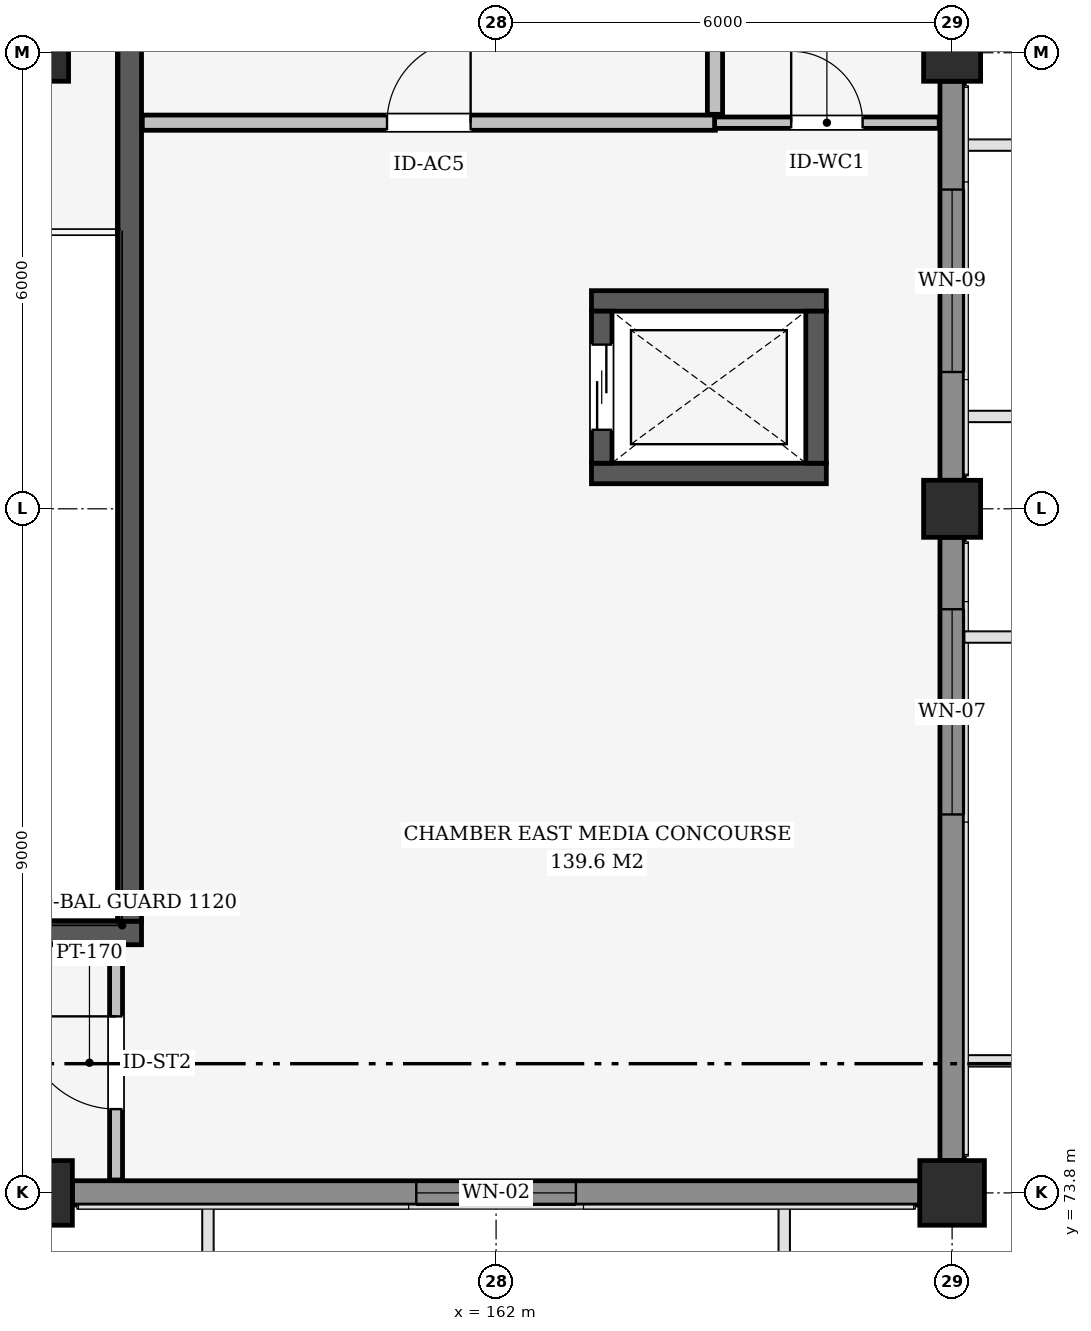
"""IFC4 building model, lengths in metres.
Left out: names, types, materials, properties, quantities, classifications, styles, units other than length and angle.
Written with IfcOpenShell. Run it as: python <this file> out.ifc"""

import sys

from ifc_helpers import new_model, si_unit, direction, frame, frame_2d, origin, origin_2d, place, context, subcontext, project, spatial, rectangle, extrude, element, fill, save


model = new_model("IFC4")
c1 = context("Model", 3, precision=1e-05, world=origin(), true_north=direction((0.0, 1.0)))
c2 = subcontext(c1, "Body", "Model", "MODEL_VIEW")
j1 = project(units=[si_unit("LENGTHUNIT", "METRE"), si_unit("PLANEANGLEUNIT", "RADIAN")], contexts=[c1])
p1 = place(None, origin())
s1 = spatial("IfcSite", under=j1, at=p1, CompositionType="ELEMENT")
p2 = place(p1, origin())
s2 = spatial("IfcBuilding", under=s1, at=p2, CompositionType="ELEMENT")
p3 = place(p2, frame((0.0, 0.0, 9.3)))
s3 = spatial("IfcBuildingStorey", under=s2, at=p3, CompositionType="ELEMENT", Elevation=9.3)
p4 = place(p3, frame((156.0, 73.8, 0.0), z_axis=(0.0, 0.0, 1.0), x_axis=(1.0, 0.0, 0.0)))
e1 = element("IfcColumn", 1, at=p4, inside=s3, PredefinedType="COLUMN", context=c2, shape_type="SweptSolid", body=[
    extrude(rectangle(XDim=0.85, YDim=0.85, at=origin_2d()), origin(), (0.0, 0.0, 1.0), 4.5),
])
p5 = place(p3, frame((156.0, 88.8, 0.0), z_axis=(0.0, 0.0, 1.0), x_axis=(1.0, 0.0, 0.0)))
e2 = element("IfcColumn", 2, at=p5, inside=s3, PredefinedType="COLUMN", context=c2, shape_type="SweptSolid", body=[
    extrude(rectangle(XDim=0.75, YDim=0.75, at=origin_2d()), origin(), (0.0, 0.0, 1.0), 4.5),
])
p6 = place(p3, frame((168.0, 73.8, 0.0), z_axis=(0.0, 0.0, 1.0), x_axis=(1.0, 0.0, 0.0)))
e3 = element("IfcColumn", 3, at=p6, inside=s3, PredefinedType="COLUMN", context=c2, shape_type="SweptSolid", body=[
    extrude(rectangle(XDim=0.85, YDim=0.85, at=origin_2d()), origin(), (0.0, 0.0, 1.0), 4.5),
])
for number, where, z_axis, x_axis in (
    (4, (168.0, 82.8, 0.0), (0.0, 0.0, 1.0), (1.0, 0.0, 0.0)),
    (5, (168.0, 88.8, 0.0), (0.0, 0.0, 1.0), (1.0, 0.0, 0.0)),
):
    element("IfcColumn", number, at=place(p3, frame(where, z_axis=z_axis, x_axis=x_axis)), inside=s3, PredefinedType="COLUMN", context=c2, shape_type="SweptSolid", body=[
        extrude(rectangle(XDim=0.75, YDim=0.75, at=origin_2d()), origin(), (0.0, 0.0, 1.0), 4.5),
    ])
p7 = place(p3, frame((144.665, 77.22, 0.0), z_axis=(0.0, 0.0, 1.0), x_axis=(1.0, 0.0, 0.0)))
e6 = element("IfcWall", 6, at=p7, inside=s3, PredefinedType="SHEAR", context=c2, shape_type="SweptSolid", body=[
    extrude(rectangle(XDim=12.67, YDim=0.31, at=frame_2d((6.335, 0.0))), origin(), (0.0, 0.0, 1.0), 2.71),
])
p8 = place(p3, frame((157.18, 77.375, 0.0), z_axis=(0.0, 0.0, 1.0), x_axis=(0.0, 1.0, 0.0)))
e7 = element("IfcWall", 7, at=p8, inside=s3, PredefinedType="SHEAR", context=c2, shape_type="SweptSolid", body=[
    extrude(rectangle(XDim=15.89, YDim=0.31, at=frame_2d((7.945, 0.0))), origin(), (0.0, 0.0, 1.0), 4.22),
])
p9 = place(p3, frame((167.575, 73.8, 0.0), z_axis=(0.0, 0.0, 1.0), x_axis=(-1.0, 0.0, 0.0)))
e8 = element("IfcWall", 8, at=p9, inside=s3, PredefinedType="SOLIDWALL", context=c2, shape_type="SweptSolid", body=[
    extrude(rectangle(XDim=11.15, YDim=0.32, at=frame_2d((5.575, 0.0))), origin(), (0.0, 0.0, 1.0), 3.664),
])
p10 = place(p9, frame((4.525, 0.0, 0.85)))
e9 = element("IfcOpeningElement", 9, at=p10, cuts=e8, PredefinedType="OPENING", context=c2, shape_type="SweptSolid", body=[
    extrude(rectangle(XDim=2.1, YDim=1.8, at=frame_2d((1.05, 0.9))), frame((0.0, 0.17, 0.0), z_axis=(0.0, -1.0, 0.0), x_axis=(1.0, 0.0, 0.0)), (0.0, 0.0, 1.0), 0.34),
])
p11 = place(p3, frame((168.0, 82.425, 0.0), z_axis=(0.0, 0.0, 1.0), x_axis=(0.0, -1.0, 0.0)))
e10 = element("IfcWall", 10, at=p11, inside=s3, PredefinedType="SOLIDWALL", context=c2, shape_type="SweptSolid", body=[
    extrude(rectangle(XDim=8.2, YDim=0.32, at=frame_2d((4.1, 0.0))), origin(), (0.0, 0.0, 1.0), 3.589),
])
p12 = place(p11, frame((0.946, 0.0, 0.85)))
e11 = element("IfcOpeningElement", 11, at=p12, cuts=e10, PredefinedType="OPENING", context=c2, shape_type="SweptSolid", body=[
    extrude(rectangle(XDim=2.7, YDim=1.95, at=frame_2d((1.35, 0.975))), frame((0.0, 0.17, 0.0), z_axis=(0.0, -1.0, 0.0), x_axis=(1.0, 0.0, 0.0)), (0.0, 0.0, 1.0), 0.34),
])
p13 = place(p3, frame((168.0, 88.425, 0.0), z_axis=(0.0, 0.0, 1.0), x_axis=(0.0, -1.0, 0.0)))
e12 = element("IfcWall", 12, at=p13, inside=s3, PredefinedType="SOLIDWALL", context=c2, shape_type="SweptSolid", body=[
    extrude(rectangle(XDim=5.25, YDim=0.32, at=frame_2d((2.625, 0.0))), origin(), (0.0, 0.0, 1.0), 3.588),
])
p14 = place(p13, frame((1.425, 0.0, 0.85)))
e13 = element("IfcOpeningElement", 13, at=p14, cuts=e12, PredefinedType="OPENING", context=c2, shape_type="SweptSolid", body=[
    extrude(rectangle(XDim=2.4, YDim=0.95, at=frame_2d((1.2, 0.475))), frame((0.0, 0.17, 0.0), z_axis=(0.0, -1.0, 0.0), x_axis=(1.0, 0.0, 0.0)), (0.0, 0.0, 1.0), 0.34),
])
for number, where, z_axis, x_axis in (
    (14, (163.255, 83.265, 0.0), (0.0, 0.0, 1.0), (1.0, 0.0, 0.0)),
    (15, (163.255, 85.535, 0.0), (0.0, 0.0, 1.0), (1.0, 0.0, 0.0)),
):
    element("IfcWall", number, at=place(p3, frame(where, z_axis=z_axis, x_axis=x_axis)), inside=s3, PredefinedType="SHEAR", context=c2, shape_type="SweptSolid", body=[
        extrude(rectangle(XDim=3.09, YDim=0.27, at=frame_2d((1.545, 0.0))), origin(), (0.0, 0.0, 1.0), 4.22),
    ])
p15 = place(p3, frame((163.39, 83.4, 0.0), z_axis=(0.0, 0.0, 1.0), x_axis=(0.0, 1.0, 0.0)))
e16 = element("IfcWall", 16, at=p15, inside=s3, PredefinedType="SHEAR", context=c2, shape_type="SweptSolid", body=[
    extrude(rectangle(XDim=2.0, YDim=0.27, at=frame_2d((1.0, 0.0))), origin(), (0.0, 0.0, 1.0), 4.22),
])
p16 = place(p15, frame((0.44, 0.0, 0.0)))
e17 = element("IfcOpeningElement", 17, at=p16, cuts=e16, PredefinedType="OPENING", context=c2, shape_type="SweptSolid", body=[
    extrude(rectangle(XDim=1.12, YDim=2.15, at=frame_2d((0.56, 1.075))), frame((0.0, 0.145, 0.0), z_axis=(0.0, -1.0, 0.0), x_axis=(1.0, 0.0, 0.0)), (0.0, 0.0, 1.0), 0.29),
])
p17 = place(p3, frame((166.21, 83.4, 0.0), z_axis=(0.0, 0.0, 1.0), x_axis=(0.0, 1.0, 0.0)))
e18 = element("IfcWall", 18, at=p17, inside=s3, PredefinedType="SHEAR", context=c2, shape_type="SweptSolid", body=[
    extrude(rectangle(XDim=2.0, YDim=0.27, at=frame_2d((1.0, 0.0))), origin(), (0.0, 0.0, 1.0), 4.22),
])
p18 = place(p3, frame((157.0, 73.97, 0.0), z_axis=(0.0, 0.0, 1.0), x_axis=(0.0, 1.0, 0.0)))
e19 = element("IfcWall", 19, at=p18, inside=s3, PredefinedType="PARTITIONING", context=c2, shape_type="SweptSolid", body=[
    extrude(rectangle(XDim=3.085, YDim=0.17, at=frame_2d((1.542, 0.0))), origin(), (0.0, 0.0, 1.0), 3.664),
])
p19 = place(p18, frame((0.933, 0.0, 0.0)))
e20 = element("IfcOpeningElement", 20, at=p19, cuts=e19, PredefinedType="OPENING", context=c2, shape_type="SweptSolid", body=[
    extrude(rectangle(XDim=1.22, YDim=2.18, at=frame_2d((0.61, 1.09))), frame((0.0, 0.095, 0.0), z_axis=(0.0, -1.0, 0.0), x_axis=(1.0, 0.0, 0.0)), (0.0, 0.0, 1.0), 0.19),
])
p20 = place(p3, frame((157.345, 87.88, 0.0), z_axis=(0.0, 0.0, 1.0), x_axis=(1.0, 0.0, 0.0)))
e21 = element("IfcWall", 21, at=p20, inside=s3, PredefinedType="PARTITIONING", context=c2, shape_type="SweptSolid", body=[
    extrude(rectangle(XDim=7.54, YDim=0.2, at=frame_2d((3.77, 0.0))), origin(), (0.0, 0.0, 1.0), 4.2),
])
p21 = place(p20, frame((3.22, 0.0, 0.0)))
e22 = element("IfcOpeningElement", 22, at=p21, cuts=e21, PredefinedType="OPENING", context=c2, shape_type="SweptSolid", body=[
    extrude(rectangle(XDim=1.1, YDim=2.26, at=frame_2d((0.55, 1.13))), frame((0.0, 0.11, 0.0), z_axis=(0.0, -1.0, 0.0), x_axis=(1.0, 0.0, 0.0)), (0.0, 0.0, 1.0), 0.22),
])
p22 = place(p3, frame((164.875, 87.88, 0.0), z_axis=(0.0, 0.0, 1.0), x_axis=(1.0, 0.0, 0.0)))
e23 = element("IfcWall", 23, at=p22, inside=s3, PredefinedType="PARTITIONING", context=c2, shape_type="SweptSolid", body=[
    extrude(rectangle(XDim=2.955, YDim=0.15, at=frame_2d((1.478, 0.0))), origin(), (0.0, 0.0, 1.0), 4.2),
])
p23 = place(p22, frame((1.008, 0.0, 0.0)))
e24 = element("IfcOpeningElement", 24, at=p23, cuts=e23, PredefinedType="OPENING", context=c2, shape_type="SweptSolid", body=[
    extrude(rectangle(XDim=0.94, YDim=2.1, at=frame_2d((0.47, 1.05))), frame((0.0, 0.085, 0.0), z_axis=(0.0, -1.0, 0.0), x_axis=(1.0, 0.0, 0.0)), (0.0, 0.0, 1.0), 0.17),
])
p24 = place(p3, frame((164.88, 87.99, 0.0), z_axis=(0.0, 0.0, 1.0), x_axis=(0.0, 1.0, 0.0)))
e25 = element("IfcWall", 25, at=p24, inside=s3, PredefinedType="PARTITIONING", context=c2, shape_type="SweptSolid", body=[
    extrude(rectangle(XDim=9.04, YDim=0.2, at=frame_2d((4.52, 0.0))), origin(), (0.0, 0.0, 1.0), 3.743),
])
p25 = place(p10, origin())
e26 = element("IfcWindow", 26, at=p25, inside=s3, PartitioningType="SINGLE_PANEL", PredefinedType="WINDOW", context=c2, shape_type="SweptSolid", body=[
    extrude(rectangle(XDim=2.1, YDim=1.8, at=frame_2d((1.05, 0.9))), frame((0.0, 0.03, 0.0), z_axis=(0.0, -1.0, 0.0), x_axis=(1.0, 0.0, 0.0)), (0.0, 0.0, 1.0), 0.06),
])
fill(e9, e26)
p26 = place(p12, origin())
e27 = element("IfcWindow", 27, at=p26, inside=s3, PartitioningType="SINGLE_PANEL", PredefinedType="WINDOW", context=c2, shape_type="SweptSolid", body=[
    extrude(rectangle(XDim=2.7, YDim=1.95, at=frame_2d((1.35, 0.975))), frame((0.0, 0.03, 0.0), z_axis=(0.0, -1.0, 0.0), x_axis=(1.0, 0.0, 0.0)), (0.0, 0.0, 1.0), 0.06),
])
fill(e11, e27)
p27 = place(p14, origin())
e28 = element("IfcWindow", 28, at=p27, inside=s3, PartitioningType="SINGLE_PANEL", PredefinedType="WINDOW", context=c2, shape_type="SweptSolid", body=[
    extrude(rectangle(XDim=2.4, YDim=0.95, at=frame_2d((1.2, 0.475))), frame((0.0, 0.03, 0.0), z_axis=(0.0, -1.0, 0.0), x_axis=(1.0, 0.0, 0.0)), (0.0, 0.0, 1.0), 0.06),
])
fill(e13, e28)
p28 = place(p16, origin())
e29 = element("IfcDoor", 29, at=p28, inside=s3, OperationType="SLIDING_TO_LEFT", PredefinedType="DOOR", context=c2, shape_type="SweptSolid", body=[
    extrude(rectangle(XDim=1.12, YDim=2.15, at=frame_2d((0.56, 1.075))), frame((0.0, 0.025, 0.0), z_axis=(0.0, -1.0, 0.0), x_axis=(1.0, 0.0, 0.0)), (0.0, 0.0, 1.0), 0.05),
])
fill(e17, e29)
p29 = place(p19, origin())
e30 = element("IfcDoor", 30, at=p29, inside=s3, OperationType="SINGLE_SWING_RIGHT", PredefinedType="DOOR", context=c2, shape_type="SweptSolid", body=[
    extrude(rectangle(XDim=1.22, YDim=2.18, at=frame_2d((0.61, 1.09))), frame((0.0, 0.025, 0.0), z_axis=(0.0, -1.0, 0.0), x_axis=(1.0, 0.0, 0.0)), (0.0, 0.0, 1.0), 0.05),
])
fill(e20, e30)
p30 = place(p21, origin())
e31 = element("IfcDoor", 31, at=p30, inside=s3, OperationType="SINGLE_SWING_RIGHT", PredefinedType="DOOR", context=c2, shape_type="SweptSolid", body=[
    extrude(rectangle(XDim=1.1, YDim=2.26, at=frame_2d((0.55, 1.13))), frame((0.0, 0.025, 0.0), z_axis=(0.0, -1.0, 0.0), x_axis=(1.0, 0.0, 0.0)), (0.0, 0.0, 1.0), 0.05),
])
fill(e22, e31)
p31 = place(p23, origin())
e32 = element("IfcDoor", 32, at=p31, inside=s3, OperationType="SINGLE_SWING_LEFT", PredefinedType="DOOR", context=c2, shape_type="SweptSolid", body=[
    extrude(rectangle(XDim=0.94, YDim=2.1, at=frame_2d((0.47, 1.05))), frame((0.0, 0.025, 0.0), z_axis=(0.0, -1.0, 0.0), x_axis=(1.0, 0.0, 0.0)), (0.0, 0.0, 1.0), 0.05),
])
fill(e24, e32)
save(model, sys.argv[1])
